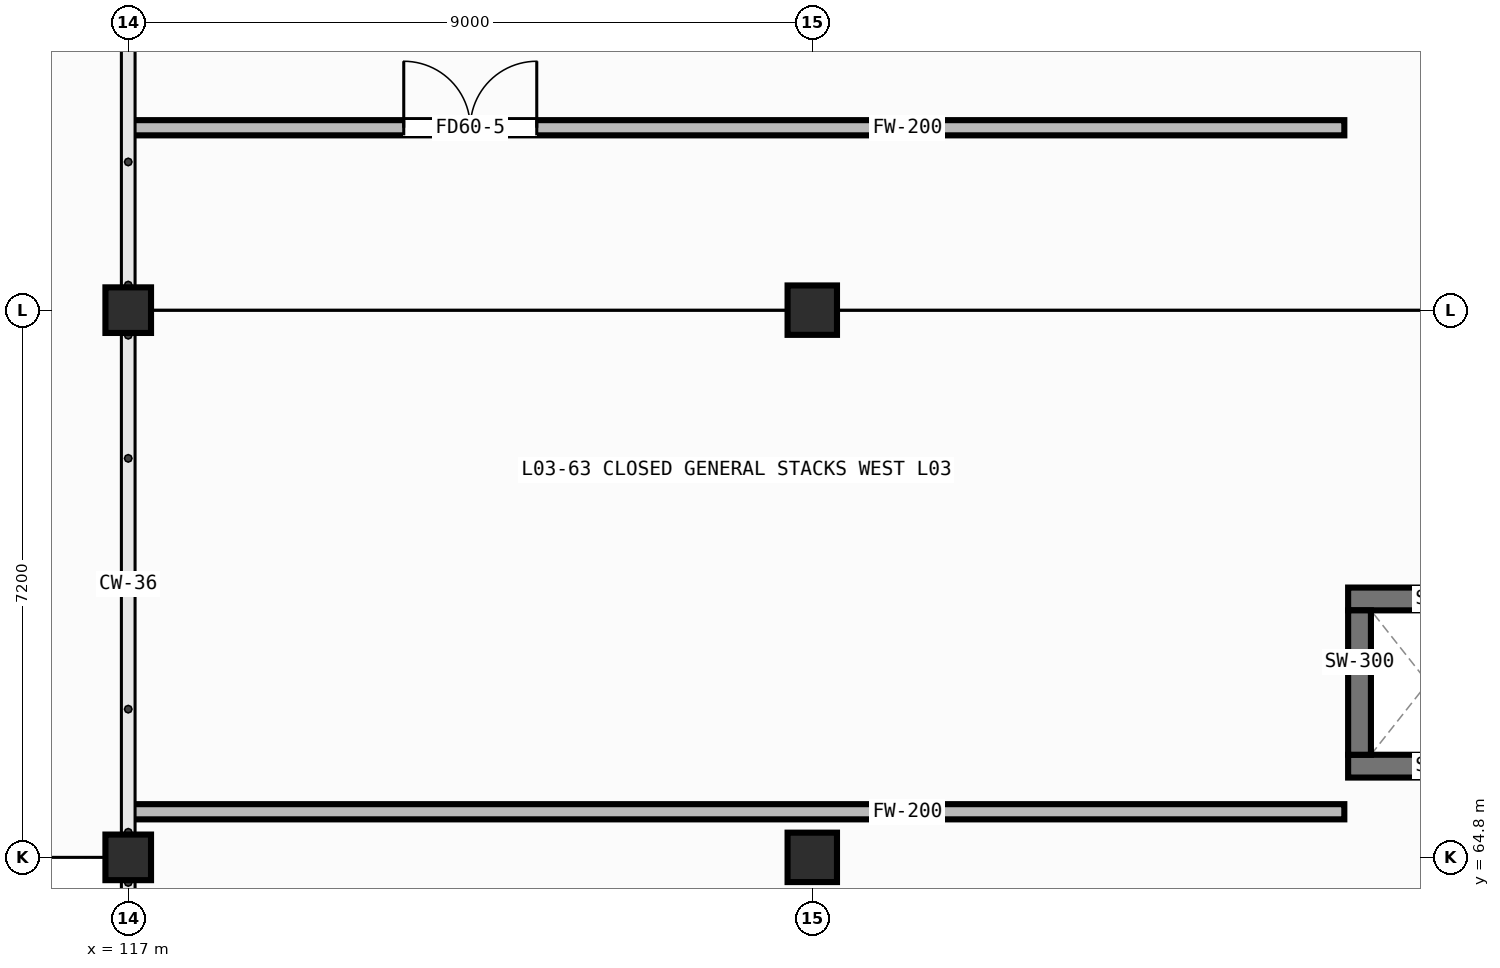
"""IFC4 building model, lengths in metres.
Left out: names, types, materials, properties, quantities, classifications, styles, units other than length and angle.
Written with IfcOpenShell. Run it as: python <this file> out.ifc"""

import sys

from ifc_helpers import new_model, si_unit, direction, frame, frame_2d, origin, origin_2d, place, context, subcontext, project, spatial, rectangle, hollow_rectangle, extrude, element, fill, save


model = new_model("IFC4")
c1 = context("Model", 3, precision=1e-05, world=origin(), true_north=direction((0.0, 1.0)))
c2 = subcontext(c1, "Body", "Model", "MODEL_VIEW")
j1 = project(units=[si_unit("LENGTHUNIT", "METRE"), si_unit("PLANEANGLEUNIT", "RADIAN")], contexts=[c1])
p1 = place(None, origin())
s1 = spatial("IfcSite", under=j1, at=p1, CompositionType="ELEMENT")
p2 = place(p1, origin())
s2 = spatial("IfcBuilding", under=s1, at=p2, CompositionType="ELEMENT")
p3 = place(p2, frame((0.0, 0.0, 8.8)))
s3 = spatial("IfcBuildingStorey", under=s2, at=p3, CompositionType="ELEMENT", Elevation=8.8)
for number, where, z_axis, x_axis in (
    (1, (117.0, 64.8, 0.0), (0.0, 0.0, 1.0), (1.0, 0.0, 0.0)),
    (2, (117.0, 72.0, 0.0), (0.0, 0.0, 1.0), (1.0, 0.0, 0.0)),
):
    element("IfcColumn", number, at=place(p3, frame(where, z_axis=z_axis, x_axis=x_axis)), inside=s3, PredefinedType="COLUMN", context=c2, shape_type="SweptSolid", body=[
        extrude(hollow_rectangle(XDim=0.6, YDim=0.6, WallThickness=0.025, at=origin_2d()), origin(), (0.0, 0.0, 1.0), 4.0),
    ])
for number, where, z_axis, x_axis in (
    (3, (126.0, 64.8, 0.0), (0.0, 0.0, 1.0), (1.0, 0.0, 0.0)),
    (4, (126.0, 72.0, 0.0), (0.0, 0.0, 1.0), (1.0, 0.0, 0.0)),
):
    element("IfcColumn", number, at=place(p3, frame(where, z_axis=z_axis, x_axis=x_axis)), inside=s3, PredefinedType="COLUMN", context=c2, shape_type="SweptSolid", body=[
        extrude(hollow_rectangle(XDim=0.65, YDim=0.65, WallThickness=0.025, at=origin_2d()), origin(), (0.0, 0.0, 1.0), 4.0),
    ])
for number, where, z_axis, x_axis in (
    (5, (133.05, 66.0, 0.0), (0.0, 0.0, 1.0), (1.0, 0.0, 0.0)),
    (6, (133.05, 68.2, 0.0), (0.0, 0.0, 1.0), (1.0, 0.0, 0.0)),
):
    element("IfcWall", number, at=place(p3, frame(where, z_axis=z_axis, x_axis=x_axis)), inside=s3, PredefinedType="SHEAR", context=c2, shape_type="SweptSolid", body=[
        extrude(rectangle(XDim=2.1, YDim=0.3, at=frame_2d((1.05, 0.0))), origin(), (0.0, 0.0, 1.0), 3.745),
    ])
p4 = place(p3, frame((133.2, 66.15, 0.0), z_axis=(0.0, 0.0, 1.0), x_axis=(0.0, 1.0, 0.0)))
e7 = element("IfcWall", 7, at=p4, inside=s3, PredefinedType="SHEAR", context=c2, shape_type="SweptSolid", body=[
    extrude(rectangle(XDim=1.9, YDim=0.3, at=frame_2d((0.95, 0.0))), origin(), (0.0, 0.0, 1.0), 3.745),
])
p5 = place(p3, frame((117.035, 65.4, 0.0), z_axis=(0.0, 0.0, 1.0), x_axis=(1.0, 0.0, 0.0)))
e8 = element("IfcWall", 8, at=p5, inside=s3, PredefinedType="PARTITIONING", context=c2, shape_type="SweptSolid", body=[
    extrude(rectangle(XDim=15.965, YDim=0.2, at=frame_2d((7.982, 0.0))), origin(), (0.0, 0.0, 1.0), 3.745),
])
p6 = place(p3, frame((117.035, 74.4, 0.0), z_axis=(0.0, 0.0, 1.0), x_axis=(1.0, 0.0, 0.0)))
e9 = element("IfcWall", 9, at=p6, inside=s3, PredefinedType="PARTITIONING", context=c2, shape_type="SweptSolid", body=[
    extrude(rectangle(XDim=15.965, YDim=0.2, at=frame_2d((7.982, 0.0))), origin(), (0.0, 0.0, 1.0), 3.745),
])
p7 = place(p6, frame((3.59, 0.0, 0.0)))
e10 = element("IfcOpeningElement", 10, at=p7, cuts=e9, PredefinedType="OPENING", context=c2, shape_type="SweptSolid", body=[
    extrude(rectangle(XDim=1.75, YDim=2.12, at=frame_2d((0.875, 1.06))), frame((0.0, 0.112, 0.0), z_axis=(0.0, -1.0, 0.0), x_axis=(1.0, 0.0, 0.0)), (0.0, 0.0, 1.0), 0.224),
])
p8 = place(p7, origin())
e11 = element("IfcDoor", 11, at=p8, inside=s3, OperationType="DOUBLE_DOOR_SINGLE_SWING", PredefinedType="DOOR", context=c2, shape_type="SweptSolid", body=[
    extrude(rectangle(XDim=1.75, YDim=2.12, at=frame_2d((0.875, 1.06))), frame((0.0, 0.025, 0.0), z_axis=(0.0, -1.0, 0.0), x_axis=(1.0, 0.0, 0.0)), (0.0, 0.0, 1.0), 0.05),
])
fill(e10, e11)
save(model, sys.argv[1])
